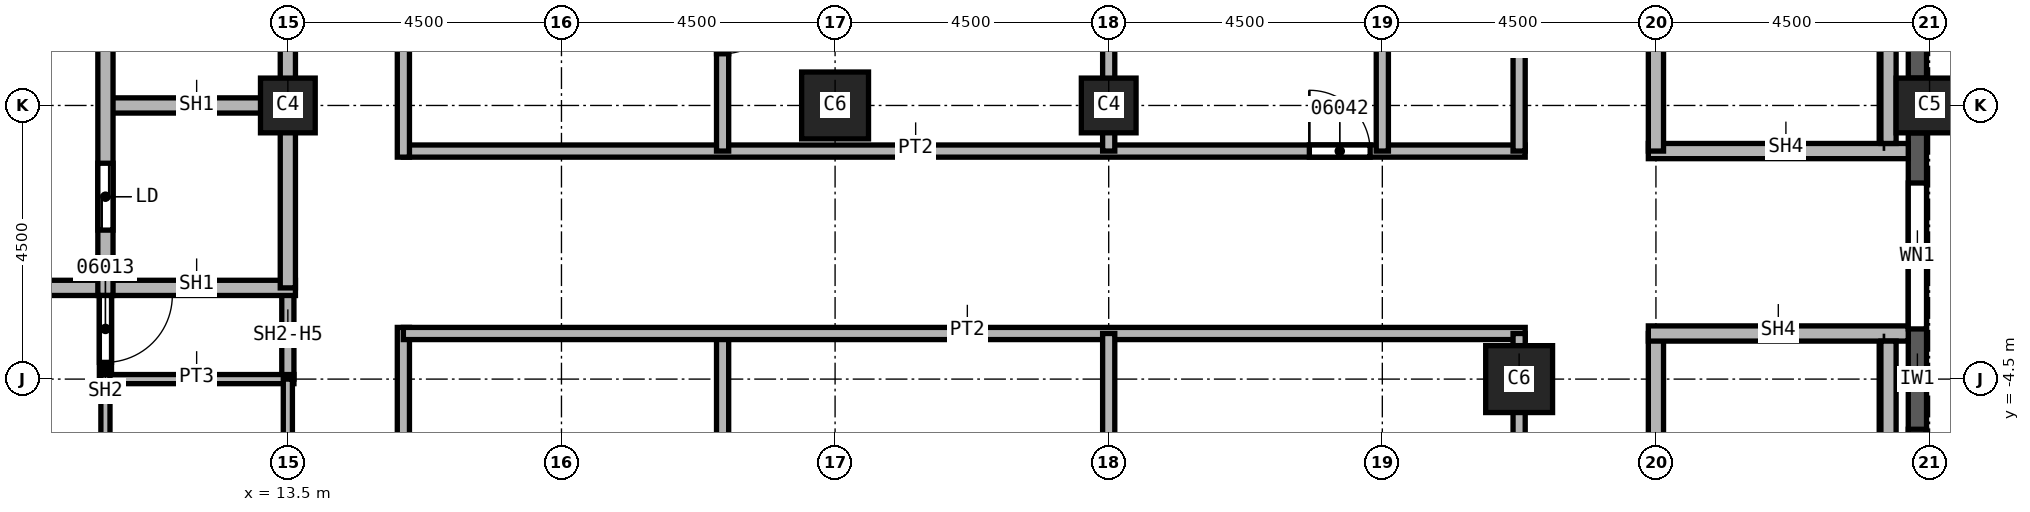
"""IFC4 building model, lengths in metres.
Left out: names, types, materials, properties, quantities, classifications, styles, units other than length and angle.
Written with IfcOpenShell. Run it as: python <this file> out.ifc"""

import sys

from ifc_helpers import new_model, si_unit, direction, frame, frame_2d, origin, origin_2d, place, context, subcontext, project, spatial, rectangle, extrude, element, fill, save


model = new_model("IFC4")
c1 = context("Model", 3, precision=1e-05, world=origin(), true_north=direction((0.0, 1.0)))
c2 = subcontext(c1, "Body", "Model", "MODEL_VIEW")
j1 = project(units=[si_unit("LENGTHUNIT", "METRE"), si_unit("PLANEANGLEUNIT", "RADIAN")], contexts=[c1])
p1 = place(None, origin())
s1 = spatial("IfcSite", under=j1, at=p1, CompositionType="ELEMENT")
p2 = place(p1, origin())
s2 = spatial("IfcBuilding", under=s1, at=p2, CompositionType="ELEMENT")
p3 = place(p2, frame((0.0, 0.0, 126.0)))
s3 = spatial("IfcBuildingStorey", under=s2, at=p3, CompositionType="ELEMENT", Elevation=126.0)
p4 = place(p3, frame((40.5, 0.0, 0.0), z_axis=(0.0, 0.0, 1.0), x_axis=(0.0, 1.0, 0.0)))
e1 = element("IfcColumn", 1, at=p4, inside=s3, PredefinedType="COLUMN", context=c2, shape_type="SweptSolid", body=[
    extrude(rectangle(XDim=0.9, YDim=1.1, at=origin_2d()), origin(), (0.0, 0.0, 1.0), 3.7),
])
for number, where, z_axis, x_axis in (
    (2, (33.75, -4.5, 0.0), (0.0, 0.0, 1.0), (1.0, 0.0, 0.0)),
    (3, (22.5, 0.0, 0.0), (0.0, 0.0, 1.0), (1.0, 0.0, 0.0)),
):
    element("IfcColumn", number, at=place(p3, frame(where, z_axis=z_axis, x_axis=x_axis)), inside=s3, PredefinedType="COLUMN", context=c2, shape_type="SweptSolid", body=[
        extrude(rectangle(XDim=1.1, YDim=1.1, at=origin_2d()), origin(), (0.0, 0.0, 1.0), 3.7),
    ])
for number, where, z_axis, x_axis in (
    (4, (13.5, 0.0, 0.0), (0.0, 0.0, 1.0), (1.0, 0.0, 0.0)),
    (5, (27.0, 0.0, 0.0), (0.0, 0.0, 1.0), (1.0, 0.0, 0.0)),
):
    element("IfcColumn", number, at=place(p3, frame(where, z_axis=z_axis, x_axis=x_axis)), inside=s3, PredefinedType="COLUMN", context=c2, shape_type="SweptSolid", body=[
        extrude(rectangle(XDim=0.9, YDim=0.9, at=origin_2d()), origin(), (0.0, 0.0, 1.0), 3.7),
    ])
p5 = place(p3, frame((40.3, -8.55, 0.0), z_axis=(0.0, 0.0, 1.0), x_axis=(0.0, 1.0, 0.0)))
e6 = element("IfcWall", 6, at=p5, inside=s3, PredefinedType="SOLIDWALL", context=c2, shape_type="SweptSolid", body=[
    extrude(rectangle(XDim=8.1, YDim=0.3, at=frame_2d((4.05, 0.0))), origin(), (0.0, 0.0, 1.0), 3.1),
])
p6 = place(p5, frame((0.825, 0.0, 0.8)))
e7 = element("IfcOpeningElement", 7, at=p6, cuts=e6, PredefinedType="OPENING", context=c2, shape_type="SweptSolid", body=[
    extrude(rectangle(XDim=2.4, YDim=1.95, at=frame_2d((1.2, 0.975))), frame((0.0, 0.15, 0.0), z_axis=(0.0, -1.0, 0.0), x_axis=(1.0, 0.0, 0.0)), (0.0, 0.0, 1.0), 0.3),
])
p7 = place(p5, frame((4.875, 0.0, 0.8)))
e8 = element("IfcOpeningElement", 8, at=p7, cuts=e6, PredefinedType="OPENING", context=c2, shape_type="SweptSolid", body=[
    extrude(rectangle(XDim=2.4, YDim=1.95, at=frame_2d((1.2, 0.975))), frame((0.0, 0.15, 0.0), z_axis=(0.0, -1.0, 0.0), x_axis=(1.0, 0.0, 0.0)), (0.0, 0.0, 1.0), 0.3),
])
p8 = place(p3, frame((40.3, 0.45, 0.0), z_axis=(0.0, 0.0, 1.0), x_axis=(0.0, 1.0, 0.0)))
e9 = element("IfcWall", 9, at=p8, inside=s3, PredefinedType="SOLIDWALL", context=c2, shape_type="SweptSolid", body=[
    extrude(rectangle(XDim=8.1, YDim=0.3, at=frame_2d((4.05, 0.0))), origin(), (0.0, 0.0, 1.0), 3.1),
])
p9 = place(p8, frame((0.825, 0.0, 0.8)))
e10 = element("IfcOpeningElement", 10, at=p9, cuts=e9, PredefinedType="OPENING", context=c2, shape_type="SweptSolid", body=[
    extrude(rectangle(XDim=2.4, YDim=1.95, at=frame_2d((1.2, 0.975))), frame((0.0, 0.15, 0.0), z_axis=(0.0, -1.0, 0.0), x_axis=(1.0, 0.0, 0.0)), (0.0, 0.0, 1.0), 0.3),
])
p10 = place(p8, frame((4.975, 0.0, 0.8)))
e11 = element("IfcOpeningElement", 11, at=p10, cuts=e9, PredefinedType="OPENING", context=c2, shape_type="SweptSolid", body=[
    extrude(rectangle(XDim=1.0, YDim=1.95, at=frame_2d((0.5, 0.975))), frame((0.0, 0.15, 0.0), z_axis=(0.0, -1.0, 0.0), x_axis=(1.0, 0.0, 0.0)), (0.0, 0.0, 1.0), 0.3),
])
p11 = place(p8, frame((6.6, 0.0, 0.8)))
e12 = element("IfcOpeningElement", 12, at=p11, cuts=e9, PredefinedType="OPENING", context=c2, shape_type="SweptSolid", body=[
    extrude(rectangle(XDim=0.6, YDim=1.95, at=frame_2d((0.3, 0.975))), frame((0.0, 0.15, 0.0), z_axis=(0.0, -1.0, 0.0), x_axis=(1.0, 0.0, 0.0)), (0.0, 0.0, 1.0), 0.3),
])
p12 = place(p3, frame((15.4, -3.65, 0.0), z_axis=(0.0, 0.0, 1.0), x_axis=(0.0, -1.0, 0.0)))
e13 = element("IfcWall", 13, at=p12, inside=s3, PredefinedType="PARTITIONING", context=c2, shape_type="SweptSolid", body=[
    extrude(rectangle(XDim=19.6, YDim=0.2, at=frame_2d((9.8, 0.0))), origin(), (0.0, 0.0, 1.0), 3.7),
])
p13 = place(p12, frame((18.25, 0.0, 0.0)))
e14 = element("IfcOpeningElement", 14, at=p13, cuts=e13, PredefinedType="OPENING", context=c2, shape_type="SweptSolid", body=[
    extrude(rectangle(XDim=1.0, YDim=2.1, at=frame_2d((0.5, 1.05))), frame((0.0, 0.1, 0.0), z_axis=(0.0, -1.0, 0.0), x_axis=(1.0, 0.0, 0.0)), (0.0, 0.0, 1.0), 0.2),
])
p14 = place(p12, frame((12.55, 0.0, 0.0)))
e15 = element("IfcOpeningElement", 15, at=p14, cuts=e13, PredefinedType="OPENING", context=c2, shape_type="SweptSolid", body=[
    extrude(rectangle(XDim=1.0, YDim=2.1, at=frame_2d((0.5, 1.05))), frame((0.0, 0.1, 0.0), z_axis=(0.0, -1.0, 0.0), x_axis=(1.0, 0.0, 0.0)), (0.0, 0.0, 1.0), 0.2),
])
p15 = place(p12, frame((4.45, 0.0, 0.0)))
e16 = element("IfcOpeningElement", 16, at=p15, cuts=e13, PredefinedType="OPENING", context=c2, shape_type="SweptSolid", body=[
    extrude(rectangle(XDim=1.0, YDim=2.1, at=frame_2d((0.5, 1.05))), frame((0.0, 0.1, 0.0), z_axis=(0.0, -1.0, 0.0), x_axis=(1.0, 0.0, 0.0)), (0.0, 0.0, 1.0), 0.2),
])
p16 = place(p3, frame((15.4, -0.75, 0.0), z_axis=(0.0, 0.0, 1.0), x_axis=(1.0, 0.0, 0.0)))
e17 = element("IfcWall", 17, at=p16, inside=s3, PredefinedType="PARTITIONING", context=c2, shape_type="SweptSolid", body=[
    extrude(rectangle(XDim=18.45, YDim=0.2, at=frame_2d((9.225, 0.0))), origin(), (0.0, 0.0, 1.0), 3.7),
])
p17 = place(p16, frame((14.9, 0.0, 0.0)))
e18 = element("IfcOpeningElement", 18, at=p17, cuts=e17, PredefinedType="OPENING", context=c2, shape_type="SweptSolid", body=[
    extrude(rectangle(XDim=1.0, YDim=2.1, at=frame_2d((0.5, 1.05))), frame((0.0, 0.1, 0.0), z_axis=(0.0, -1.0, 0.0), x_axis=(1.0, 0.0, 0.0)), (0.0, 0.0, 1.0), 0.2),
])
p18 = place(p3, frame((15.4, 8.7, 0.0), z_axis=(0.0, 0.0, 1.0), x_axis=(0.0, -1.0, 0.0)))
e19 = element("IfcWall", 19, at=p18, inside=s3, PredefinedType="PARTITIONING", context=c2, shape_type="SweptSolid", body=[
    extrude(rectangle(XDim=9.55, YDim=0.2, at=frame_2d((4.775, 0.0))), origin(), (0.0, 0.0, 1.0), 3.7),
])
p19 = place(p18, frame((1.6, 0.0, 0.0)))
e20 = element("IfcOpeningElement", 20, at=p19, cuts=e19, PredefinedType="OPENING", context=c2, shape_type="SweptSolid", body=[
    extrude(rectangle(XDim=1.0, YDim=2.1, at=frame_2d((0.5, 1.05))), frame((0.0, 0.1, 0.0), z_axis=(0.0, -1.0, 0.0), x_axis=(1.0, 0.0, 0.0)), (0.0, 0.0, 1.0), 0.2),
])
p20 = place(p3, frame((20.65, -3.75, 0.0), z_axis=(0.0, 0.0, 1.0), x_axis=(0.0, -1.0, 0.0)))
e21 = element("IfcWall", 21, at=p20, inside=s3, PredefinedType="PARTITIONING", context=c2, shape_type="SweptSolid", body=[
    extrude(rectangle(XDim=9.75, YDim=0.2, at=frame_2d((4.875, 0.0))), origin(), (0.0, 0.0, 1.0), 3.7),
])
p21 = place(p20, frame((3.4, 0.0, 0.0)))
e22 = element("IfcOpeningElement", 22, at=p21, cuts=e21, PredefinedType="OPENING", context=c2, shape_type="SweptSolid", body=[
    extrude(rectangle(XDim=1.0, YDim=2.1, at=frame_2d((0.5, 1.05))), frame((0.0, 0.1, 0.0), z_axis=(0.0, -1.0, 0.0), x_axis=(1.0, 0.0, 0.0)), (0.0, 0.0, 1.0), 0.2),
])
p22 = place(p3, frame((20.65, 8.7, 0.0), z_axis=(0.0, 0.0, 1.0), x_axis=(0.0, -1.0, 0.0)))
e23 = element("IfcWall", 23, at=p22, inside=s3, PredefinedType="PARTITIONING", context=c2, shape_type="SweptSolid", body=[
    extrude(rectangle(XDim=9.45, YDim=0.2, at=frame_2d((4.725, 0.0))), origin(), (0.0, 0.0, 1.0), 3.7),
])
p23 = place(p22, frame((6.85, 0.0, 0.0)))
e24 = element("IfcOpeningElement", 24, at=p23, cuts=e23, PredefinedType="OPENING", context=c2, shape_type="SweptSolid", body=[
    extrude(rectangle(XDim=1.0, YDim=2.1, at=frame_2d((0.5, 1.05))), frame((0.0, 0.1, 0.0), z_axis=(0.0, -1.0, 0.0), x_axis=(1.0, 0.0, 0.0)), (0.0, 0.0, 1.0), 0.2),
])
p24 = place(p3, frame((33.85, -3.75, 0.0), z_axis=(0.0, 0.0, 1.0), x_axis=(-1.0, 0.0, 0.0)))
e25 = element("IfcWall", 25, at=p24, inside=s3, PredefinedType="PARTITIONING", context=c2, shape_type="SweptSolid", body=[
    extrude(rectangle(XDim=18.45, YDim=0.2, at=frame_2d((9.225, 0.0))), origin(), (0.0, 0.0, 1.0), 3.7),
])
p25 = place(p3, frame((27.0, -3.75, 0.0), z_axis=(0.0, 0.0, 1.0), x_axis=(0.0, -1.0, 0.0)))
e26 = element("IfcWall", 26, at=p25, inside=s3, PredefinedType="PARTITIONING", context=c2, shape_type="SweptSolid", body=[
    extrude(rectangle(XDim=13.7, YDim=0.2, at=frame_2d((6.85, 0.0))), origin(), (0.0, 0.0, 1.0), 3.7),
])
p26 = place(p3, frame((27.0, 9.0, 0.0), z_axis=(0.0, 0.0, 1.0), x_axis=(0.0, -1.0, 0.0)))
e27 = element("IfcWall", 27, at=p26, inside=s3, PredefinedType="PARTITIONING", context=c2, shape_type="SweptSolid", body=[
    extrude(rectangle(XDim=9.75, YDim=0.2, at=frame_2d((4.875, 0.0))), origin(), (0.0, 0.0, 1.0), 3.7),
])
p27 = place(p3, frame((31.5, 17.45, 0.0), z_axis=(0.0, 0.0, 1.0), x_axis=(0.0, -1.0, 0.0)))
e28 = element("IfcWall", 28, at=p27, inside=s3, PredefinedType="PARTITIONING", context=c2, shape_type="SweptSolid", body=[
    extrude(rectangle(XDim=18.2, YDim=0.2, at=frame_2d((9.1, 0.0))), origin(), (0.0, 0.0, 1.0), 3.7),
])
p28 = place(p3, frame((33.75, -11.25, 0.0), z_axis=(0.0, 0.0, 1.0), x_axis=(0.0, 1.0, 0.0)))
e29 = element("IfcWall", 29, at=p28, inside=s3, PredefinedType="PARTITIONING", context=c2, shape_type="SweptSolid", body=[
    extrude(rectangle(XDim=7.5, YDim=0.2, at=frame_2d((3.75, 0.0))), origin(), (0.0, 0.0, 1.0), 3.7),
])
p29 = place(p28, frame((3.25, 0.0, 0.0)))
e30 = element("IfcOpeningElement", 30, at=p29, cuts=e29, PredefinedType="OPENING", context=c2, shape_type="SweptSolid", body=[
    extrude(rectangle(XDim=1.0, YDim=2.1, at=frame_2d((0.5, 1.05))), frame((0.0, 0.1, 0.0), z_axis=(0.0, -1.0, 0.0), x_axis=(1.0, 0.0, 0.0)), (0.0, 0.0, 1.0), 0.2),
])
p30 = place(p3, frame((33.75, -0.75, 0.0), z_axis=(0.0, 0.0, 1.0), x_axis=(0.0, 1.0, 0.0)))
e31 = element("IfcWall", 31, at=p30, inside=s3, PredefinedType="PARTITIONING", context=c2, shape_type="SweptSolid", body=[
    extrude(rectangle(XDim=7.5, YDim=0.2, at=frame_2d((3.75, 0.0))), origin(), (0.0, 0.0, 1.0), 3.7),
])
p31 = place(p30, frame((3.4, 0.0, 0.0)))
e32 = element("IfcOpeningElement", 32, at=p31, cuts=e31, PredefinedType="OPENING", context=c2, shape_type="SweptSolid", body=[
    extrude(rectangle(XDim=1.0, YDim=2.1, at=frame_2d((0.5, 1.05))), frame((0.0, 0.1, 0.0), z_axis=(0.0, -1.0, 0.0), x_axis=(1.0, 0.0, 0.0)), (0.0, 0.0, 1.0), 0.2),
])
p32 = place(p3, frame((10.5, -2.875, 0.0), z_axis=(0.0, 0.0, 1.0), x_axis=(0.0, -1.0, 0.0)))
e33 = element("IfcWall", 33, at=p32, inside=s3, PredefinedType="SOLIDWALL", context=c2, shape_type="SweptSolid", body=[
    extrude(rectangle(XDim=1.7, YDim=0.2, at=frame_2d((0.85, 0.0))), origin(), (0.0, 0.0, 1.0), 3.7),
])
p33 = place(p32, frame((0.25, 0.0, 0.0)))
e34 = element("IfcOpeningElement", 34, at=p33, cuts=e33, PredefinedType="OPENING", context=c2, shape_type="SweptSolid", body=[
    extrude(rectangle(XDim=1.1, YDim=2.1, at=frame_2d((0.55, 1.05))), frame((0.0, 0.1, 0.0), z_axis=(0.0, -1.0, 0.0), x_axis=(1.0, 0.0, 0.0)), (0.0, 0.0, 1.0), 0.2),
])
p34 = place(p3, frame((13.5, -3.0, 0.0), z_axis=(0.0, 0.0, 1.0), x_axis=(0.0, -1.0, 0.0)))
e35 = element("IfcWall", 35, at=p34, inside=s3, PredefinedType="SOLIDWALL", context=c2, shape_type="SweptSolid", body=[
    extrude(rectangle(XDim=1.5, YDim=0.2, at=frame_2d((0.75, 0.0))), origin(), (0.0, 0.0, 1.0), 2.938),
])
p35 = place(p3, frame((7.5, -3.0, 0.0), z_axis=(0.0, 0.0, 1.0), x_axis=(1.0, 0.0, 0.0)))
e36 = element("IfcWall", 36, at=p35, inside=s3, PredefinedType="SOLIDWALL", context=c2, shape_type="SweptSolid", body=[
    extrude(rectangle(XDim=6.125, YDim=0.25, at=frame_2d((3.062, 0.0))), origin(), (0.0, 0.0, 1.0), 3.7),
])
p36 = place(p35, frame((0.25, 0.0, 0.0)))
e37 = element("IfcOpeningElement", 37, at=p36, cuts=e36, PredefinedType="OPENING", context=c2, shape_type="SweptSolid", body=[
    extrude(rectangle(XDim=1.1, YDim=2.1, at=frame_2d((0.55, 1.05))), frame((0.0, 0.125, 0.0), z_axis=(0.0, -1.0, 0.0), x_axis=(1.0, 0.0, 0.0)), (0.0, 0.0, 1.0), 0.25),
])
p37 = place(p3, frame((10.5, 0.0, 0.0), z_axis=(0.0, 0.0, 1.0), x_axis=(1.0, 0.0, 0.0)))
e38 = element("IfcWall", 38, at=p37, inside=s3, PredefinedType="SOLIDWALL", context=c2, shape_type="SweptSolid", body=[
    extrude(rectangle(XDim=3.125, YDim=0.25, at=frame_2d((1.562, 0.0))), origin(), (0.0, 0.0, 1.0), 3.7),
])
p38 = place(p3, frame((10.5, 6.125, 0.0), z_axis=(0.0, 0.0, 1.0), x_axis=(0.0, -1.0, 0.0)))
e39 = element("IfcWall", 39, at=p38, inside=s3, PredefinedType="SOLIDWALL", context=c2, shape_type="SweptSolid", body=[
    extrude(rectangle(XDim=9.25, YDim=0.25, at=frame_2d((4.625, 0.0))), origin(), (0.0, 0.0, 1.0), 3.7),
])
p39 = place(p38, frame((7.075, 0.0, 0.0)))
e40 = element("IfcOpeningElement", 40, at=p39, cuts=e39, PredefinedType="OPENING", context=c2, shape_type="SweptSolid", body=[
    extrude(rectangle(XDim=1.1, YDim=2.1, at=frame_2d((0.55, 1.05))), frame((0.0, 0.125, 0.0), z_axis=(0.0, -1.0, 0.0), x_axis=(1.0, 0.0, 0.0)), (0.0, 0.0, 1.0), 0.25),
])
p40 = place(p38, frame((4.075, 0.0, 0.0)))
e41 = element("IfcOpeningElement", 41, at=p40, cuts=e39, PredefinedType="OPENING", context=c2, shape_type="SweptSolid", body=[
    extrude(rectangle(XDim=1.1, YDim=2.1, at=frame_2d((0.55, 1.05))), frame((0.0, 0.125, 0.0), z_axis=(0.0, -1.0, 0.0), x_axis=(1.0, 0.0, 0.0)), (0.0, 0.0, 1.0), 0.25),
])
p41 = place(p3, frame((13.5, 6.0, 0.0), z_axis=(0.0, 0.0, 1.0), x_axis=(0.0, -1.0, 0.0)))
e42 = element("IfcWall", 42, at=p41, inside=s3, PredefinedType="SOLIDWALL", context=c2, shape_type="SweptSolid", body=[
    extrude(rectangle(XDim=9.0, YDim=0.25, at=frame_2d((4.5, 0.0))), origin(), (0.0, 0.0, 1.0), 2.938),
])
p42 = place(p3, frame((35.875, -0.75, 0.0), z_axis=(0.0, 0.0, 1.0), x_axis=(1.0, 0.0, 0.0)))
e43 = element("IfcWall", 43, at=p42, inside=s3, PredefinedType="SOLIDWALL", context=c2, shape_type="SweptSolid", body=[
    extrude(rectangle(XDim=4.275, YDim=0.25, at=frame_2d((2.137, 0.0))), origin(), (0.0, 0.0, 1.0), 3.7),
])
p43 = place(p3, frame((36.0, -11.375, 0.0), z_axis=(0.0, 0.0, 1.0), x_axis=(0.0, 1.0, 0.0)))
e44 = element("IfcWall", 44, at=p43, inside=s3, PredefinedType="SOLIDWALL", context=c2, shape_type="SweptSolid", body=[
    extrude(rectangle(XDim=7.625, YDim=0.25, at=frame_2d((3.812, 0.0))), origin(), (0.0, 0.0, 1.0), 3.7),
])
p44 = place(p43, frame((0.4, 0.0, 0.0)))
e45 = element("IfcOpeningElement", 45, at=p44, cuts=e44, PredefinedType="OPENING", context=c2, shape_type="SweptSolid", body=[
    extrude(rectangle(XDim=1.2, YDim=2.1, at=frame_2d((0.6, 1.05))), frame((0.0, 0.125, 0.0), z_axis=(0.0, -1.0, 0.0), x_axis=(1.0, 0.0, 0.0)), (0.0, 0.0, 1.0), 0.25),
])
p45 = place(p3, frame((36.0, -0.75, 0.0), z_axis=(0.0, 0.0, 1.0), x_axis=(0.0, 1.0, 0.0)))
e46 = element("IfcWall", 46, at=p45, inside=s3, PredefinedType="SOLIDWALL", context=c2, shape_type="SweptSolid", body=[
    extrude(rectangle(XDim=7.625, YDim=0.25, at=frame_2d((3.812, 0.0))), origin(), (0.0, 0.0, 1.0), 3.7),
])
p46 = place(p45, frame((5.95, 0.0, 0.0)))
e47 = element("IfcOpeningElement", 47, at=p46, cuts=e46, PredefinedType="OPENING", context=c2, shape_type="SweptSolid", body=[
    extrude(rectangle(XDim=1.2, YDim=2.1, at=frame_2d((0.6, 1.05))), frame((0.0, 0.125, 0.0), z_axis=(0.0, -1.0, 0.0), x_axis=(1.0, 0.0, 0.0)), (0.0, 0.0, 1.0), 0.25),
])
p47 = place(p3, frame((40.15, -3.75, 0.0), z_axis=(0.0, 0.0, 1.0), x_axis=(-1.0, 0.0, 0.0)))
e48 = element("IfcWall", 48, at=p47, inside=s3, PredefinedType="SOLIDWALL", context=c2, shape_type="SweptSolid", body=[
    extrude(rectangle(XDim=4.275, YDim=0.25, at=frame_2d((2.137, 0.0))), origin(), (0.0, 0.0, 1.0), 3.7),
])
p48 = place(p3, frame((10.5, -4.5, 0.0), z_axis=(0.0, 0.0, 1.0), x_axis=(1.0, 0.0, 0.0)))
e49 = element("IfcWall", 49, at=p48, inside=s3, PredefinedType="PARTITIONING", context=c2, shape_type="SweptSolid", body=[
    extrude(rectangle(XDim=3.1, YDim=0.15, at=frame_2d((1.55, 0.0))), origin(), (0.0, 0.0, 1.0), 3.7),
])
p49 = place(p3, frame((10.5, -4.425, 0.0), z_axis=(0.0, 0.0, 1.0), x_axis=(0.0, -1.0, 0.0)))
e50 = element("IfcWall", 50, at=p49, inside=s3, PredefinedType="PARTITIONING", context=c2, shape_type="SweptSolid", body=[
    extrude(rectangle(XDim=4.65, YDim=0.15, at=frame_2d((2.325, 0.0))), origin(), (0.0, 0.0, 1.0), 3.7),
])
p50 = place(p49, frame((2.8, 0.0, 0.0)))
e51 = element("IfcOpeningElement", 51, at=p50, cuts=e50, PredefinedType="OPENING", context=c2, shape_type="SweptSolid", body=[
    extrude(rectangle(XDim=0.9, YDim=2.1, at=frame_2d((0.45, 1.05))), frame((0.0, 0.075, 0.0), z_axis=(0.0, -1.0, 0.0), x_axis=(1.0, 0.0, 0.0)), (0.0, 0.0, 1.0), 0.15),
])
p51 = place(p3, frame((13.5, -4.5, 0.0), z_axis=(0.0, 0.0, 1.0), x_axis=(0.0, -1.0, 0.0)))
e52 = element("IfcWall", 52, at=p51, inside=s3, PredefinedType="PARTITIONING", context=c2, shape_type="SweptSolid", body=[
    extrude(rectangle(XDim=4.575, YDim=0.15, at=frame_2d((2.288, 0.0))), origin(), (0.0, 0.0, 1.0), 2.938),
])
for number, where, z_axis, x_axis in (
    (53, (39.825, -11.125, 0.0), (0.0, 0.0, 1.0), (0.0, 1.0, 0.0)),
    (54, (39.825, -0.625, 0.0), (0.0, 0.0, 1.0), (0.0, 1.0, 0.0)),
):
    element("IfcWall", number, at=place(p3, frame(where, z_axis=z_axis, x_axis=x_axis)), inside=s3, PredefinedType="SOLIDWALL", context=c2, shape_type="SweptSolid", body=[
        extrude(rectangle(XDim=7.25, YDim=0.25, at=frame_2d((3.625, 0.0))), origin(), (0.0, 0.0, 1.0), 3.7),
    ])
p52 = place(p6, origin())
e55 = element("IfcWindow", 55, at=p52, inside=s3, PartitioningType="SINGLE_PANEL", PredefinedType="WINDOW", context=c2, shape_type="SweptSolid", body=[
    extrude(rectangle(XDim=2.4, YDim=1.95, at=frame_2d((1.2, 0.975))), frame((0.0, 0.03, 0.0), z_axis=(0.0, -1.0, 0.0), x_axis=(1.0, 0.0, 0.0)), (0.0, 0.0, 1.0), 0.06),
])
fill(e7, e55)
p53 = place(p7, origin())
e56 = element("IfcWindow", 56, at=p53, inside=s3, PartitioningType="SINGLE_PANEL", PredefinedType="WINDOW", context=c2, shape_type="SweptSolid", body=[
    extrude(rectangle(XDim=2.4, YDim=1.95, at=frame_2d((1.2, 0.975))), frame((0.0, 0.03, 0.0), z_axis=(0.0, -1.0, 0.0), x_axis=(1.0, 0.0, 0.0)), (0.0, 0.0, 1.0), 0.06),
])
fill(e8, e56)
p54 = place(p33, origin())
e57 = element("IfcDoor", 57, at=p54, inside=s3, OperationType="SINGLE_SWING_RIGHT", PredefinedType="DOOR", context=c2, shape_type="SweptSolid", body=[
    extrude(rectangle(XDim=1.1, YDim=2.1, at=frame_2d((0.55, 1.05))), frame((0.0, 0.025, 0.0), z_axis=(0.0, -1.0, 0.0), x_axis=(1.0, 0.0, 0.0)), (0.0, 0.0, 1.0), 0.05),
])
fill(e34, e57)
p55 = place(p23, origin())
e58 = element("IfcDoor", 58, at=p55, inside=s3, OperationType="SINGLE_SWING_LEFT", PredefinedType="DOOR", context=c2, shape_type="SweptSolid", body=[
    extrude(rectangle(XDim=1.0, YDim=2.1, at=frame_2d((0.5, 1.05))), frame((0.0, 0.025, 0.0), z_axis=(0.0, -1.0, 0.0), x_axis=(1.0, 0.0, 0.0)), (0.0, 0.0, 1.0), 0.05),
])
fill(e24, e58)
p56 = place(p17, origin())
e59 = element("IfcDoor", 59, at=p56, inside=s3, OperationType="SINGLE_SWING_LEFT", PredefinedType="DOOR", context=c2, shape_type="SweptSolid", body=[
    extrude(rectangle(XDim=1.0, YDim=2.1, at=frame_2d((0.5, 1.05))), frame((0.0, 0.025, 0.0), z_axis=(0.0, -1.0, 0.0), x_axis=(1.0, 0.0, 0.0)), (0.0, 0.0, 1.0), 0.05),
])
fill(e18, e59)
p57 = place(p39, origin())
e60 = element("IfcDoor", 60, at=p57, inside=s3, OperationType="SLIDING_TO_LEFT", PredefinedType="DOOR", context=c2, shape_type="SweptSolid", body=[
    extrude(rectangle(XDim=1.1, YDim=2.1, at=frame_2d((0.55, 1.05))), frame((0.0, 0.025, 0.0), z_axis=(0.0, -1.0, 0.0), x_axis=(1.0, 0.0, 0.0)), (0.0, 0.0, 1.0), 0.05),
])
fill(e40, e60)
save(model, sys.argv[1])
